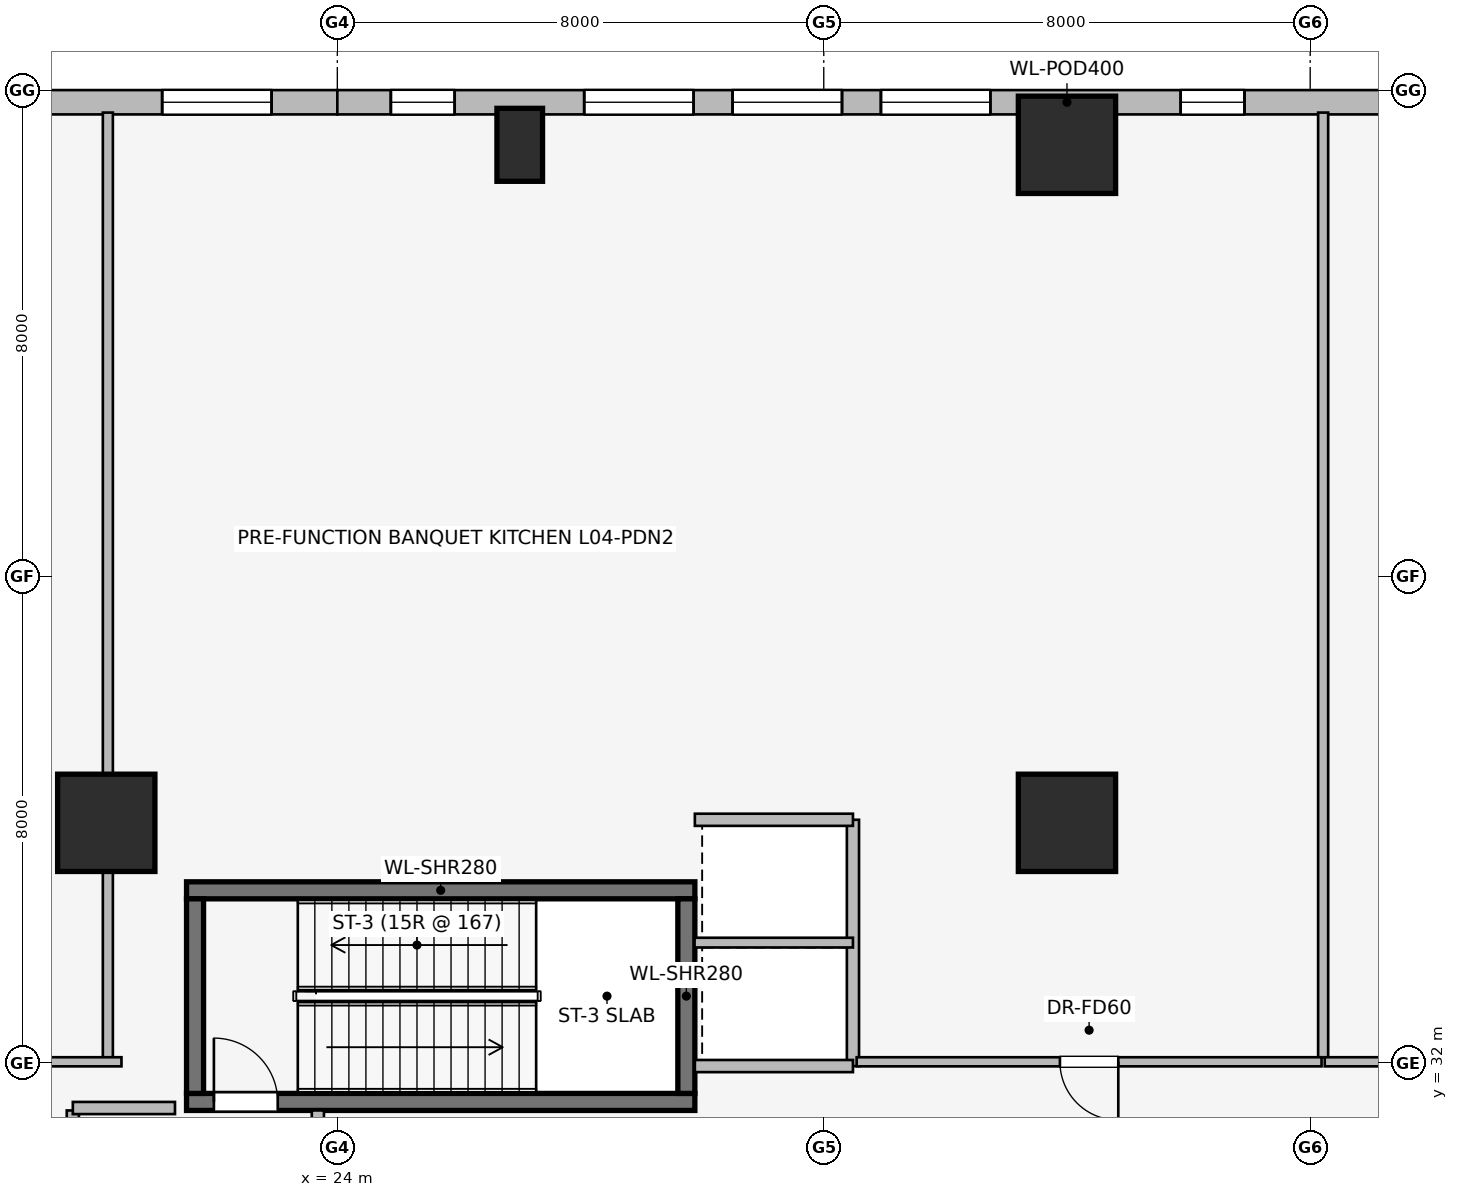
"""IFC4 building model, lengths in metres.
Left out: names, types, materials, properties, quantities, classifications, styles, units other than length and angle.
Written with IfcOpenShell. Run it as: python <this file> out.ifc"""

import sys

from ifc_helpers import new_model, si_unit, direction, frame, frame_2d, origin, origin_2d, place, context, subcontext, project, spatial, rectangle, extrude, element, fill, save


model = new_model("IFC4")
c1 = context("Model", 3, precision=1e-05, world=origin(), true_north=direction((0.0, 1.0)))
c2 = subcontext(c1, "Body", "Model", "MODEL_VIEW")
j1 = project(units=[si_unit("LENGTHUNIT", "METRE"), si_unit("PLANEANGLEUNIT", "RADIAN")], contexts=[c1])
p1 = place(None, origin())
s1 = spatial("IfcSite", under=j1, at=p1, CompositionType="ELEMENT")
p2 = place(p1, origin())
s2 = spatial("IfcBuilding", under=s1, at=p2, CompositionType="ELEMENT")
p3 = place(p2, frame((0.0, 0.0, 16.0)))
s3 = spatial("IfcBuildingStorey", under=s2, at=p3, CompositionType="ELEMENT", Elevation=16.0)
p4 = place(p3, frame((21.52, 31.36, 0.0), z_axis=(0.0, 0.0, 1.0), x_axis=(1.0, 0.0, 0.0)))
e1 = element("IfcWall", 1, at=p4, inside=s3, PredefinedType="SHEAR", context=c2, shape_type="SweptSolid", body=[
    extrude(rectangle(XDim=8.36, YDim=0.28, at=frame_2d((4.18, 0.0))), origin(), (0.0, 0.0, 1.0), 5.0),
])
p5 = place(p4, frame((0.45, 0.0, 0.0)))
e2 = element("IfcOpeningElement", 2, at=p5, cuts=e1, PredefinedType="OPENING", context=c2, shape_type="SweptSolid", body=[
    extrude(rectangle(XDim=1.05, YDim=2.0, at=frame_2d((0.525, 1.0))), frame((0.0, 0.15, 0.0), z_axis=(0.0, -1.0, 0.0), x_axis=(1.0, 0.0, 0.0)), (0.0, 0.0, 1.0), 0.3),
])
p6 = place(p3, frame((29.88, 34.84, 0.0), z_axis=(0.0, 0.0, 1.0), x_axis=(-1.0, 0.0, 0.0)))
e3 = element("IfcWall", 3, at=p6, inside=s3, PredefinedType="SHEAR", context=c2, shape_type="SweptSolid", body=[
    extrude(rectangle(XDim=8.36, YDim=0.28, at=frame_2d((4.18, 0.0))), origin(), (0.0, 0.0, 1.0), 5.0),
])
for number, where, z_axis, x_axis in (
    (4, (21.66, 34.7, 0.0), (0.0, 0.0, 1.0), (0.0, -1.0, 0.0)),
    (5, (29.74, 31.5, 0.0), (0.0, 0.0, 1.0), (0.0, 1.0, 0.0)),
):
    element("IfcWall", number, at=place(p3, frame(where, z_axis=z_axis, x_axis=x_axis)), inside=s3, PredefinedType="SHEAR", context=c2, shape_type="SweptSolid", body=[
        extrude(rectangle(XDim=3.2, YDim=0.28, at=frame_2d((1.6, 0.0))), origin(), (0.0, 0.0, 1.0), 5.0),
    ])
for number, where, z_axis, x_axis in (
    (6, (36.0, 47.1, 0.0), (0.0, 0.0, 1.0), (1.0, 0.0, 0.0)),
    (7, (20.2, 35.95, 0.0), (0.0, 0.0, 1.0), (1.0, 0.0, 0.0)),
    (8, (36.0, 35.95, 0.0), (0.0, 0.0, 1.0), (1.0, 0.0, 0.0)),
):
    element("IfcColumn", number, at=place(p3, frame(where, z_axis=z_axis, x_axis=x_axis)), inside=s3, PredefinedType="COLUMN", context=c2, shape_type="SweptSolid", body=[
        extrude(rectangle(XDim=1.6, YDim=1.6, at=origin_2d()), origin(), (0.0, 0.0, 1.0), 5.0),
    ])
p7 = place(p3, frame((27.0, 47.1, 0.0), z_axis=(0.0, 0.0, 1.0), x_axis=(1.0, 0.0, 0.0)))
e9 = element("IfcColumn", 9, at=p7, inside=s3, PredefinedType="PILASTER", context=c2, shape_type="SweptSolid", body=[
    extrude(rectangle(XDim=0.75, YDim=1.2, at=origin_2d()), origin(), (0.0, 0.0, 1.0), 5.0),
])
p8 = place(p3, frame((0.0, 47.8, 0.0), z_axis=(0.0, 0.0, 1.0), x_axis=(1.0, 0.0, 0.0)))
e10 = element("IfcWall", 10, at=p8, inside=s3, PredefinedType="STANDARD", context=c2, shape_type="SweptSolid", body=[
    extrude(rectangle(XDim=24.0, YDim=0.4, at=frame_2d((12.0, 0.0))), origin(), (0.0, 0.0, 1.0), 4.58),
])
p9 = place(p8, frame((3.65, 0.0, 0.75)))
e11 = element("IfcOpeningElement", 11, at=p9, cuts=e10, PredefinedType="OPENING", context=c2, shape_type="SweptSolid", body=[
    extrude(rectangle(XDim=2.8, YDim=1.8, at=frame_2d((1.4, 0.9))), frame((0.0, 0.21, 0.0), z_axis=(0.0, -1.0, 0.0), x_axis=(1.0, 0.0, 0.0)), (0.0, 0.0, 1.0), 0.42),
])
p10 = place(p8, frame((10.27, 0.0, 0.75)))
e12 = element("IfcOpeningElement", 12, at=p10, cuts=e10, PredefinedType="OPENING", context=c2, shape_type="SweptSolid", body=[
    extrude(rectangle(XDim=1.8, YDim=1.5, at=frame_2d((0.9, 0.75))), frame((0.0, 0.21, 0.0), z_axis=(0.0, -1.0, 0.0), x_axis=(1.0, 0.0, 0.0)), (0.0, 0.0, 1.0), 0.42),
])
p11 = place(p8, frame((13.13, 0.0, 0.75)))
e13 = element("IfcOpeningElement", 13, at=p11, cuts=e10, PredefinedType="OPENING", context=c2, shape_type="SweptSolid", body=[
    extrude(rectangle(XDim=1.8, YDim=1.5, at=frame_2d((0.9, 0.75))), frame((0.0, 0.21, 0.0), z_axis=(0.0, -1.0, 0.0), x_axis=(1.0, 0.0, 0.0)), (0.0, 0.0, 1.0), 0.42),
])
p12 = place(p8, frame((18.077, 0.0, 0.75)))
e14 = element("IfcOpeningElement", 14, at=p12, cuts=e10, PredefinedType="OPENING", context=c2, shape_type="SweptSolid", body=[
    extrude(rectangle(XDim=1.05, YDim=1.4, at=frame_2d((0.525, 0.7))), frame((0.0, 0.21, 0.0), z_axis=(0.0, -1.0, 0.0), x_axis=(1.0, 0.0, 0.0)), (0.0, 0.0, 1.0), 0.42),
])
p13 = place(p8, frame((21.119, 0.0, 0.75)))
e15 = element("IfcOpeningElement", 15, at=p13, cuts=e10, PredefinedType="OPENING", context=c2, shape_type="SweptSolid", body=[
    extrude(rectangle(XDim=1.8, YDim=1.5, at=frame_2d((0.9, 0.75))), frame((0.0, 0.21, 0.0), z_axis=(0.0, -1.0, 0.0), x_axis=(1.0, 0.0, 0.0)), (0.0, 0.0, 1.0), 0.42),
])
p14 = place(p3, frame((24.0, 47.8, 0.0), z_axis=(0.0, 0.0, 1.0), x_axis=(1.0, 0.0, 0.0)))
e16 = element("IfcWall", 16, at=p14, inside=s3, PredefinedType="STANDARD", context=c2, shape_type="SweptSolid", body=[
    extrude(rectangle(XDim=24.0, YDim=0.4, at=frame_2d((12.0, 0.0))), origin(), (0.0, 0.0, 1.0), 4.58),
])
p15 = place(p14, frame((0.88, 0.0, 0.75)))
e17 = element("IfcOpeningElement", 17, at=p15, cuts=e16, PredefinedType="OPENING", context=c2, shape_type="SweptSolid", body=[
    extrude(rectangle(XDim=1.05, YDim=1.4, at=frame_2d((0.525, 0.7))), frame((0.0, 0.21, 0.0), z_axis=(0.0, -1.0, 0.0), x_axis=(1.0, 0.0, 0.0)), (0.0, 0.0, 1.0), 0.42),
])
p16 = place(p14, frame((4.06, 0.0, 0.75)))
e18 = element("IfcOpeningElement", 18, at=p16, cuts=e16, PredefinedType="OPENING", context=c2, shape_type="SweptSolid", body=[
    extrude(rectangle(XDim=1.8, YDim=1.5, at=frame_2d((0.9, 0.75))), frame((0.0, 0.21, 0.0), z_axis=(0.0, -1.0, 0.0), x_axis=(1.0, 0.0, 0.0)), (0.0, 0.0, 1.0), 0.42),
])
p17 = place(p14, frame((6.5, 0.0, 0.75)))
e19 = element("IfcOpeningElement", 19, at=p17, cuts=e16, PredefinedType="OPENING", context=c2, shape_type="SweptSolid", body=[
    extrude(rectangle(XDim=1.8, YDim=1.5, at=frame_2d((0.9, 0.75))), frame((0.0, 0.21, 0.0), z_axis=(0.0, -1.0, 0.0), x_axis=(1.0, 0.0, 0.0)), (0.0, 0.0, 1.0), 0.42),
])
p18 = place(p14, frame((8.94, 0.0, 0.75)))
e20 = element("IfcOpeningElement", 20, at=p18, cuts=e16, PredefinedType="OPENING", context=c2, shape_type="SweptSolid", body=[
    extrude(rectangle(XDim=1.8, YDim=1.5, at=frame_2d((0.9, 0.75))), frame((0.0, 0.21, 0.0), z_axis=(0.0, -1.0, 0.0), x_axis=(1.0, 0.0, 0.0)), (0.0, 0.0, 1.0), 0.42),
])
p19 = place(p14, frame((13.87, 0.0, 0.75)))
e21 = element("IfcOpeningElement", 21, at=p19, cuts=e16, PredefinedType="OPENING", context=c2, shape_type="SweptSolid", body=[
    extrude(rectangle(XDim=1.05, YDim=1.4, at=frame_2d((0.525, 0.7))), frame((0.0, 0.21, 0.0), z_axis=(0.0, -1.0, 0.0), x_axis=(1.0, 0.0, 0.0)), (0.0, 0.0, 1.0), 0.42),
])
p20 = place(p14, frame((17.518, 0.0, 0.75)))
e22 = element("IfcOpeningElement", 22, at=p20, cuts=e16, PredefinedType="OPENING", context=c2, shape_type="SweptSolid", body=[
    extrude(rectangle(XDim=1.8, YDim=1.5, at=frame_2d((0.9, 0.75))), frame((0.0, 0.21, 0.0), z_axis=(0.0, -1.0, 0.0), x_axis=(1.0, 0.0, 0.0)), (0.0, 0.0, 1.0), 0.42),
])
p21 = place(p14, frame((22.07, 0.0, 0.75)))
e23 = element("IfcOpeningElement", 23, at=p21, cuts=e16, PredefinedType="OPENING", context=c2, shape_type="SweptSolid", body=[
    extrude(rectangle(XDim=1.05, YDim=1.4, at=frame_2d((0.525, 0.7))), frame((0.0, 0.21, 0.0), z_axis=(0.0, -1.0, 0.0), x_axis=(1.0, 0.0, 0.0)), (0.0, 0.0, 1.0), 0.42),
])
p22 = place(p3, frame((19.65, 25.68, 0.0), z_axis=(0.0, 0.0, 1.0), x_axis=(0.0, 1.0, 0.0)))
e24 = element("IfcWall", 24, at=p22, inside=s3, PredefinedType="PARTITIONING", context=c2, shape_type="SweptSolid", body=[
    extrude(rectangle(XDim=5.54, YDim=0.2, at=frame_2d((2.77, 0.0))), origin(), (0.0, 0.0, 1.0), 4.58),
])
p23 = place(p22, frame((0.62, 0.0, 0.0)))
e25 = element("IfcOpeningElement", 25, at=p23, cuts=e24, PredefinedType="OPENING", context=c2, shape_type="SweptSolid", body=[
    extrude(rectangle(XDim=1.1, YDim=2.2, at=frame_2d((0.55, 1.1))), frame((0.0, 0.11, 0.0), z_axis=(0.0, -1.0, 0.0), x_axis=(1.0, 0.0, 0.0)), (0.0, 0.0, 1.0), 0.22),
])
p24 = place(p22, frame((3.12, 0.0, 0.0)))
e26 = element("IfcOpeningElement", 26, at=p24, cuts=e24, PredefinedType="OPENING", context=c2, shape_type="SweptSolid", body=[
    extrude(rectangle(XDim=1.1, YDim=2.2, at=frame_2d((0.55, 1.1))), frame((0.0, 0.11, 0.0), z_axis=(0.0, -1.0, 0.0), x_axis=(1.0, 0.0, 0.0)), (0.0, 0.0, 1.0), 0.22),
])
p25 = place(p3, frame((23.68, 25.68, 0.0), z_axis=(0.0, 0.0, 1.0), x_axis=(0.0, 1.0, 0.0)))
e27 = element("IfcWall", 27, at=p25, inside=s3, PredefinedType="PARTITIONING", context=c2, shape_type="SweptSolid", body=[
    extrude(rectangle(XDim=5.54, YDim=0.2, at=frame_2d((2.77, 0.0))), origin(), (0.0, 0.0, 1.0), 4.58),
])
p26 = place(p25, frame((1.8, 0.0, 0.0)))
e28 = element("IfcOpeningElement", 28, at=p26, cuts=e27, PredefinedType="OPENING", context=c2, shape_type="SweptSolid", body=[
    extrude(rectangle(XDim=1.05, YDim=2.0, at=frame_2d((0.525, 1.0))), frame((0.0, 0.11, 0.0), z_axis=(0.0, -1.0, 0.0), x_axis=(1.0, 0.0, 0.0)), (0.0, 0.0, 1.0), 0.22),
])
p27 = place(p3, frame((21.33, 31.26, 0.0), z_axis=(0.0, 0.0, 1.0), x_axis=(-1.0, 0.0, 0.0)))
e29 = element("IfcWall", 29, at=p27, inside=s3, PredefinedType="PARTITIONING", context=c2, shape_type="SweptSolid", body=[
    extrude(rectangle(XDim=1.68, YDim=0.2, at=frame_2d((0.84, 0.0))), origin(), (0.0, 0.0, 1.0), 4.58),
])
p28 = place(p3, frame((32.48, 31.95, 0.0), z_axis=(0.0, 0.0, 1.0), x_axis=(0.0, 1.0, 0.0)))
e30 = element("IfcWall", 30, at=p28, inside=s3, PredefinedType="PARTITIONING", context=c2, shape_type="SweptSolid", body=[
    extrude(rectangle(XDim=4.05, YDim=0.2, at=frame_2d((2.025, 0.0))), origin(), (0.0, 0.0, 1.0), 4.58),
])
p29 = place(p3, frame((29.88, 36.0, 0.0), z_axis=(0.0, 0.0, 1.0), x_axis=(1.0, 0.0, 0.0)))
e31 = element("IfcWall", 31, at=p29, inside=s3, PredefinedType="PARTITIONING", context=c2, shape_type="SweptSolid", body=[
    extrude(rectangle(XDim=2.6, YDim=0.2, at=frame_2d((1.3, 0.0))), origin(), (0.0, 0.0, 1.0), 3.632),
])
p30 = place(p3, frame((32.48, 31.95, 0.0), z_axis=(0.0, 0.0, 1.0), x_axis=(-1.0, 0.0, 0.0)))
e32 = element("IfcWall", 32, at=p30, inside=s3, PredefinedType="PARTITIONING", context=c2, shape_type="SweptSolid", body=[
    extrude(rectangle(XDim=2.6, YDim=0.2, at=frame_2d((1.3, 0.0))), origin(), (0.0, 0.0, 1.0), 4.58),
])
p31 = place(p3, frame((29.875, 33.98, 0.0), z_axis=(0.0, 0.0, 1.0), x_axis=(1.0, 0.0, 0.0)))
e33 = element("IfcWall", 33, at=p31, inside=s3, PredefinedType="PARTITIONING", context=c2, shape_type="SweptSolid", body=[
    extrude(rectangle(XDim=2.605, YDim=0.16, at=frame_2d((1.302, 0.0))), origin(), (0.0, 0.0, 1.0), 4.58),
])
p32 = place(p3, frame((20.226, 32.09, 0.0), z_axis=(0.0, 0.0, 1.0), x_axis=(0.0, 1.0, 0.0)))
e34 = element("IfcWall", 34, at=p32, inside=s3, PredefinedType="PARTITIONING", context=c2, shape_type="SweptSolid", body=[
    extrude(rectangle(XDim=15.54, YDim=0.165, at=frame_2d((7.77, 0.0))), origin(), (0.0, 0.0, 1.0), 4.58),
])
p33 = place(p3, frame((40.213, 32.09, 0.0), z_axis=(0.0, 0.0, 1.0), x_axis=(0.0, 1.0, 0.0)))
e35 = element("IfcWall", 35, at=p33, inside=s3, PredefinedType="PARTITIONING", context=c2, shape_type="SweptSolid", body=[
    extrude(rectangle(XDim=15.54, YDim=0.165, at=frame_2d((7.77, 0.0))), origin(), (0.0, 0.0, 1.0), 3.972),
])
p34 = place(p3, frame((20.45, 32.02, 0.0), z_axis=(0.0, 0.0, 1.0), x_axis=(-1.0, 0.0, 0.0)))
e36 = element("IfcWall", 36, at=p34, inside=s3, PredefinedType="PARTITIONING", context=c2, shape_type="SweptSolid", body=[
    extrude(rectangle(XDim=20.055, YDim=0.15, at=frame_2d((10.027, 0.0))), origin(), (0.0, 0.0, 1.0), 3.632),
])
p35 = place(p34, frame((9.5, 0.0, 0.0)))
e37 = element("IfcOpeningElement", 37, at=p35, cuts=e36, PredefinedType="OPENING", context=c2, shape_type="SweptSolid", body=[
    extrude(rectangle(XDim=0.96, YDim=2.0, at=frame_2d((0.48, 1.0))), frame((0.0, 0.085, 0.0), z_axis=(0.0, -1.0, 0.0), x_axis=(1.0, 0.0, 0.0)), (0.0, 0.0, 1.0), 0.17),
])
p36 = place(p3, frame((40.187, 32.02, 0.0), z_axis=(0.0, 0.0, 1.0), x_axis=(-1.0, 0.0, 0.0)))
e38 = element("IfcWall", 38, at=p36, inside=s3, PredefinedType="PARTITIONING", context=c2, shape_type="SweptSolid", body=[
    extrude(rectangle(XDim=7.646, YDim=0.15, at=frame_2d((3.823, 0.0))), origin(), (0.0, 0.0, 1.0), 4.58),
])
p37 = place(p36, frame((3.343, 0.0, 0.0)))
e39 = element("IfcOpeningElement", 39, at=p37, cuts=e38, PredefinedType="OPENING", context=c2, shape_type="SweptSolid", body=[
    extrude(rectangle(XDim=0.96, YDim=2.0, at=frame_2d((0.48, 1.0))), frame((0.0, 0.085, 0.0), z_axis=(0.0, -1.0, 0.0), x_axis=(1.0, 0.0, 0.0)), (0.0, 0.0, 1.0), 0.17),
])
p38 = place(p3, frame((57.214, 32.02, 0.0), z_axis=(0.0, 0.0, 1.0), x_axis=(-1.0, 0.0, 0.0)))
e40 = element("IfcWall", 40, at=p38, inside=s3, PredefinedType="PARTITIONING", context=c2, shape_type="SweptSolid", body=[
    extrude(rectangle(XDim=16.975, YDim=0.15, at=frame_2d((8.488, 0.0))), origin(), (0.0, 0.0, 1.0), 3.632),
])
p39 = place(p38, frame((7.956, 0.0, 0.0)))
e41 = element("IfcOpeningElement", 41, at=p39, cuts=e40, PredefinedType="OPENING", context=c2, shape_type="SweptSolid", body=[
    extrude(rectangle(XDim=0.96, YDim=2.0, at=frame_2d((0.48, 1.0))), frame((0.0, 0.085, 0.0), z_axis=(0.0, -1.0, 0.0), x_axis=(1.0, 0.0, 0.0)), (0.0, 0.0, 1.0), 0.17),
])
p40 = place(p13, origin())
e42 = element("IfcWindow", 42, at=p40, inside=s3, PartitioningType="SINGLE_PANEL", PredefinedType="WINDOW", context=c2, shape_type="SweptSolid", body=[
    extrude(rectangle(XDim=1.8, YDim=1.5, at=frame_2d((0.9, 0.75))), frame((0.0, 0.03, 0.0), z_axis=(0.0, -1.0, 0.0), x_axis=(1.0, 0.0, 0.0)), (0.0, 0.0, 1.0), 0.06),
])
fill(e15, e42)
p41 = place(p15, origin())
e43 = element("IfcWindow", 43, at=p41, inside=s3, PartitioningType="SINGLE_PANEL", PredefinedType="WINDOW", context=c2, shape_type="SweptSolid", body=[
    extrude(rectangle(XDim=1.05, YDim=1.4, at=frame_2d((0.525, 0.7))), frame((0.0, 0.03, 0.0), z_axis=(0.0, -1.0, 0.0), x_axis=(1.0, 0.0, 0.0)), (0.0, 0.0, 1.0), 0.06),
])
fill(e17, e43)
p42 = place(p16, origin())
e44 = element("IfcWindow", 44, at=p42, inside=s3, PartitioningType="SINGLE_PANEL", PredefinedType="WINDOW", context=c2, shape_type="SweptSolid", body=[
    extrude(rectangle(XDim=1.8, YDim=1.5, at=frame_2d((0.9, 0.75))), frame((0.0, 0.03, 0.0), z_axis=(0.0, -1.0, 0.0), x_axis=(1.0, 0.0, 0.0)), (0.0, 0.0, 1.0), 0.06),
])
fill(e18, e44)
p43 = place(p17, origin())
e45 = element("IfcWindow", 45, at=p43, inside=s3, PartitioningType="SINGLE_PANEL", PredefinedType="WINDOW", context=c2, shape_type="SweptSolid", body=[
    extrude(rectangle(XDim=1.8, YDim=1.5, at=frame_2d((0.9, 0.75))), frame((0.0, 0.03, 0.0), z_axis=(0.0, -1.0, 0.0), x_axis=(1.0, 0.0, 0.0)), (0.0, 0.0, 1.0), 0.06),
])
fill(e19, e45)
p44 = place(p18, origin())
e46 = element("IfcWindow", 46, at=p44, inside=s3, PartitioningType="SINGLE_PANEL", PredefinedType="WINDOW", context=c2, shape_type="SweptSolid", body=[
    extrude(rectangle(XDim=1.8, YDim=1.5, at=frame_2d((0.9, 0.75))), frame((0.0, 0.03, 0.0), z_axis=(0.0, -1.0, 0.0), x_axis=(1.0, 0.0, 0.0)), (0.0, 0.0, 1.0), 0.06),
])
fill(e20, e46)
p45 = place(p19, origin())
e47 = element("IfcWindow", 47, at=p45, inside=s3, PartitioningType="SINGLE_PANEL", PredefinedType="WINDOW", context=c2, shape_type="SweptSolid", body=[
    extrude(rectangle(XDim=1.05, YDim=1.4, at=frame_2d((0.525, 0.7))), frame((0.0, 0.03, 0.0), z_axis=(0.0, -1.0, 0.0), x_axis=(1.0, 0.0, 0.0)), (0.0, 0.0, 1.0), 0.06),
])
fill(e21, e47)
p46 = place(p5, origin())
e48 = element("IfcDoor", 48, at=p46, inside=s3, OperationType="SINGLE_SWING_LEFT", PredefinedType="DOOR", context=c2, shape_type="SweptSolid", body=[
    extrude(rectangle(XDim=1.05, YDim=2.0, at=frame_2d((0.525, 1.0))), frame((0.0, 0.025, 0.0), z_axis=(0.0, -1.0, 0.0), x_axis=(1.0, 0.0, 0.0)), (0.0, 0.0, 1.0), 0.05),
])
fill(e2, e48)
p47 = place(p37, origin())
e49 = element("IfcDoor", 49, at=p47, inside=s3, OperationType="SINGLE_SWING_LEFT", PredefinedType="DOOR", context=c2, shape_type="SweptSolid", body=[
    extrude(rectangle(XDim=0.96, YDim=2.0, at=frame_2d((0.48, 1.0))), frame((0.0, 0.025, 0.0), z_axis=(0.0, -1.0, 0.0), x_axis=(1.0, 0.0, 0.0)), (0.0, 0.0, 1.0), 0.05),
])
fill(e39, e49)
save(model, sys.argv[1])
